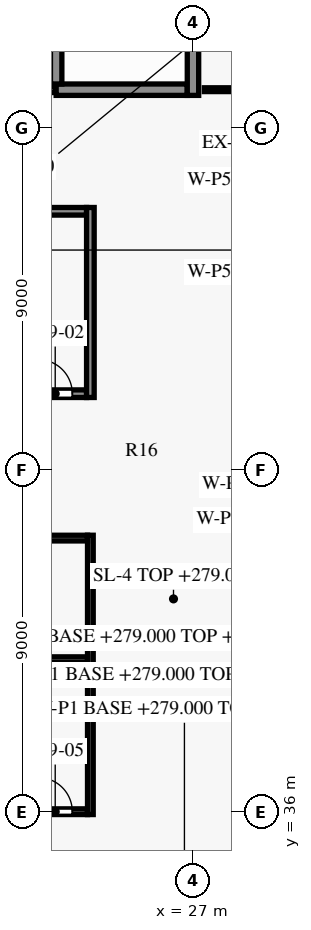
"""IFC4 building model, lengths in metres.
Left out: names, types, materials, properties, quantities, classifications, styles, units other than length and angle.
Written with IfcOpenShell. Run it as: python <this file> out.ifc"""

import sys

from ifc_helpers import new_model, si_unit, direction, frame, frame_2d, origin, place, context, subcontext, project, spatial, rectangle, extrude, element, fill, save


model = new_model("IFC4")
c1 = context("Model", 3, precision=1e-05, world=origin(), true_north=direction((0.0, 1.0)))
c2 = subcontext(c1, "Body", "Model", "MODEL_VIEW")
j1 = project(units=[si_unit("LENGTHUNIT", "METRE"), si_unit("PLANEANGLEUNIT", "RADIAN")], contexts=[c1])
p1 = place(None, origin())
s1 = spatial("IfcSite", under=j1, at=p1, CompositionType="ELEMENT")
p2 = place(p1, origin())
s2 = spatial("IfcBuilding", under=s1, at=p2, CompositionType="ELEMENT")
p3 = place(p2, frame((0.0, 0.0, 279.0)))
s3 = spatial("IfcBuildingStorey", under=s2, at=p3, CompositionType="ELEMENT", Elevation=279.0)
p4 = place(p3, frame((12.4, 36.0, 0.0), z_axis=(0.0, 0.0, 1.0), x_axis=(1.0, 0.0, 0.0)))
e1 = element("IfcWall", 1, at=p4, inside=s3, PredefinedType="SHEAR", context=c2, shape_type="SweptSolid", body=[
    extrude(rectangle(XDim=11.825, YDim=0.15, at=frame_2d((5.913, 0.0))), origin(), (0.0, 0.0, 1.0), 3.5),
])
p5 = place(p4, frame((1.525, 0.0, 0.0)))
e2 = element("IfcOpeningElement", 2, at=p5, cuts=e1, PredefinedType="OPENING", context=c2, shape_type="SweptSolid", body=[
    extrude(rectangle(XDim=0.95, YDim=2.1, at=frame_2d((0.475, 1.05))), frame((0.0, 0.085, 0.0), z_axis=(0.0, -1.0, 0.0), x_axis=(1.0, 0.0, 0.0)), (0.0, 0.0, 1.0), 0.17),
])
p6 = place(p4, frame((5.75, 0.0, 0.0)))
e3 = element("IfcOpeningElement", 3, at=p6, cuts=e1, PredefinedType="OPENING", context=c2, shape_type="SweptSolid", body=[
    extrude(rectangle(XDim=0.9, YDim=2.1, at=frame_2d((0.45, 1.05))), frame((0.0, 0.085, 0.0), z_axis=(0.0, -1.0, 0.0), x_axis=(1.0, 0.0, 0.0)), (0.0, 0.0, 1.0), 0.17),
])
p7 = place(p4, frame((10.525, 0.0, 0.0)))
e4 = element("IfcOpeningElement", 4, at=p7, cuts=e1, PredefinedType="OPENING", context=c2, shape_type="SweptSolid", body=[
    extrude(rectangle(XDim=0.9, YDim=2.1, at=frame_2d((0.45, 1.05))), frame((0.0, 0.085, 0.0), z_axis=(0.0, -1.0, 0.0), x_axis=(1.0, 0.0, 0.0)), (0.0, 0.0, 1.0), 0.17),
])
p8 = place(p3, frame((8.1, 40.0, 0.0), z_axis=(0.0, 0.0, 1.0), x_axis=(1.0, 0.0, 0.0)))
e5 = element("IfcWall", 5, at=p8, inside=s3, PredefinedType="SHEAR", context=c2, shape_type="SweptSolid", body=[
    extrude(rectangle(XDim=16.125, YDim=0.15, at=frame_2d((8.062, 0.0))), origin(), (0.0, 0.0, 1.0), 3.5),
])
p9 = place(p3, frame((8.1, 43.2, 0.0), z_axis=(0.0, 0.0, 1.0), x_axis=(1.0, 0.0, 0.0)))
e6 = element("IfcWall", 6, at=p9, inside=s3, PredefinedType="SHEAR", context=c2, shape_type="SweptSolid", body=[
    extrude(rectangle(XDim=16.125, YDim=0.15, at=frame_2d((8.062, 0.0))), origin(), (0.0, 0.0, 1.0), 3.5),
])
p10 = place(p9, frame((5.825, 0.0, 0.0)))
e7 = element("IfcOpeningElement", 7, at=p10, cuts=e6, PredefinedType="OPENING", context=c2, shape_type="SweptSolid", body=[
    extrude(rectangle(XDim=0.9, YDim=2.1, at=frame_2d((0.45, 1.05))), frame((0.0, 0.085, 0.0), z_axis=(0.0, -1.0, 0.0), x_axis=(1.0, 0.0, 0.0)), (0.0, 0.0, 1.0), 0.17),
])
p11 = place(p9, frame((13.075, 0.0, 0.0)))
e8 = element("IfcOpeningElement", 8, at=p11, cuts=e6, PredefinedType="OPENING", context=c2, shape_type="SweptSolid", body=[
    extrude(rectangle(XDim=0.9, YDim=2.1, at=frame_2d((0.45, 1.05))), frame((0.0, 0.085, 0.0), z_axis=(0.0, -1.0, 0.0), x_axis=(1.0, 0.0, 0.0)), (0.0, 0.0, 1.0), 0.17),
])
p12 = place(p3, frame((21.6, 47.0, 0.0), z_axis=(0.0, 0.0, 1.0), x_axis=(1.0, 0.0, 0.0)))
e9 = element("IfcWall", 9, at=p12, inside=s3, PredefinedType="SHEAR", context=c2, shape_type="SweptSolid", body=[
    extrude(rectangle(XDim=2.6, YDim=0.2, at=frame_2d((1.3, 0.0))), origin(), (0.0, 0.0, 1.0), 3.5),
])
p13 = place(p12, frame((1.325, 0.0, 0.0)))
e10 = element("IfcOpeningElement", 10, at=p13, cuts=e9, PredefinedType="OPENING", context=c2, shape_type="SweptSolid", body=[
    extrude(rectangle(XDim=0.9, YDim=2.1, at=frame_2d((0.45, 1.05))), frame((0.0, 0.11, 0.0), z_axis=(0.0, -1.0, 0.0), x_axis=(1.0, 0.0, 0.0)), (0.0, 0.0, 1.0), 0.22),
])
p14 = place(p3, frame((21.6, 51.8, 0.0), z_axis=(0.0, 0.0, 1.0), x_axis=(1.0, 0.0, 0.0)))
e11 = element("IfcWall", 11, at=p14, inside=s3, PredefinedType="SHEAR", context=c2, shape_type="SweptSolid", body=[
    extrude(rectangle(XDim=2.6, YDim=0.2, at=frame_2d((1.3, 0.0))), origin(), (0.0, 0.0, 1.0), 3.5),
])
p15 = place(p3, frame((13.5, 55.0, 0.0), z_axis=(0.0, 0.0, 1.0), x_axis=(1.0, 0.0, 0.0)))
e12 = element("IfcWall", 12, at=p15, inside=s3, PredefinedType="SHEAR", context=c2, shape_type="SweptSolid", body=[
    extrude(rectangle(XDim=9.9, YDim=0.15, at=frame_2d((4.95, 0.0))), origin(), (0.0, 0.0, 1.0), 3.5),
])
p16 = place(p15, frame((2.45, 0.0, 0.0)))
e13 = element("IfcOpeningElement", 13, at=p16, cuts=e12, PredefinedType="OPENING", context=c2, shape_type="SweptSolid", body=[
    extrude(rectangle(XDim=1.0, YDim=2.1, at=frame_2d((0.5, 1.05))), frame((0.0, 0.085, 0.0), z_axis=(0.0, -1.0, 0.0), x_axis=(1.0, 0.0, 0.0)), (0.0, 0.0, 1.0), 0.17),
])
p17 = place(p15, frame((7.4, 0.0, 0.0)))
e14 = element("IfcOpeningElement", 14, at=p17, cuts=e12, PredefinedType="OPENING", context=c2, shape_type="SweptSolid", body=[
    extrude(rectangle(XDim=1.0, YDim=2.1, at=frame_2d((0.5, 1.05))), frame((0.0, 0.085, 0.0), z_axis=(0.0, -1.0, 0.0), x_axis=(1.0, 0.0, 0.0)), (0.0, 0.0, 1.0), 0.17),
])
p18 = place(p3, frame((23.4, 55.0, 0.0), z_axis=(0.0, 0.0, 1.0), x_axis=(1.0, 0.0, 0.0)))
e15 = element("IfcWall", 15, at=p18, inside=s3, PredefinedType="SHEAR", context=c2, shape_type="SweptSolid", body=[
    extrude(rectangle(XDim=3.45, YDim=0.3, at=frame_2d((1.725, 0.0))), origin(), (0.0, 0.0, 1.0), 3.5),
])
p19 = place(p3, frame((23.4, 55.15, 0.0), z_axis=(0.0, 0.0, 1.0), x_axis=(0.0, 1.0, 0.0)))
e16 = element("IfcWall", 16, at=p19, inside=s3, PredefinedType="SHEAR", context=c2, shape_type="SweptSolid", body=[
    extrude(rectangle(XDim=8.0, YDim=0.3, at=frame_2d((4.0, 0.0))), origin(), (0.0, 0.0, 1.0), 3.5),
])
p20 = place(p3, frame((24.3, 35.925, 0.0), z_axis=(0.0, 0.0, 1.0), x_axis=(0.0, 1.0, 0.0)))
e17 = element("IfcWall", 17, at=p20, inside=s3, PredefinedType="SHEAR", context=c2, shape_type="SweptSolid", body=[
    extrude(rectangle(XDim=7.35, YDim=0.15, at=frame_2d((3.675, 0.0))), origin(), (0.0, 0.0, 1.0), 3.5),
])
p21 = place(p3, frame((24.3, 46.9, 0.0), z_axis=(0.0, 0.0, 1.0), x_axis=(0.0, 1.0, 0.0)))
e18 = element("IfcWall", 18, at=p21, inside=s3, PredefinedType="SHEAR", context=c2, shape_type="SweptSolid", body=[
    extrude(rectangle(XDim=5.0, YDim=0.2, at=frame_2d((2.5, 0.0))), origin(), (0.0, 0.0, 1.0), 3.5),
])
p22 = place(p3, frame((27.0, 54.85, 0.0), z_axis=(0.0, 0.0, 1.0), x_axis=(0.0, 1.0, 0.0)))
e19 = element("IfcWall", 19, at=p22, inside=s3, PredefinedType="SHEAR", context=c2, shape_type="SweptSolid", body=[
    extrude(rectangle(XDim=8.6, YDim=0.3, at=frame_2d((4.3, 0.0))), origin(), (0.0, 0.0, 1.0), 3.5),
])
p23 = place(p22, frame((6.55, 0.0, 0.0)))
e20 = element("IfcOpeningElement", 20, at=p23, cuts=e19, PredefinedType="OPENING", context=c2, shape_type="SweptSolid", body=[
    extrude(rectangle(XDim=1.2, YDim=2.2, at=frame_2d((0.6, 1.1))), frame((0.0, 0.16, 0.0), z_axis=(0.0, -1.0, 0.0), x_axis=(1.0, 0.0, 0.0)), (0.0, 0.0, 1.0), 0.32),
])
p24 = place(p3, frame((27.3, 55.0, 0.0), z_axis=(0.0, 0.0, 1.0), x_axis=(1.0, 0.0, 0.0)))
e21 = element("IfcWall", 21, at=p24, inside=s3, PredefinedType="PARTITIONING", context=c2, shape_type="SweptSolid", body=[
    extrude(rectangle(XDim=3.7, YDim=0.1, at=frame_2d((1.85, 0.0))), origin(), (0.0, 0.0, 1.0), 3.33),
])
p25 = place(p24, frame((1.425, 0.0, 0.0)))
e22 = element("IfcOpeningElement", 22, at=p25, cuts=e21, PredefinedType="OPENING", context=c2, shape_type="SweptSolid", body=[
    extrude(rectangle(XDim=0.9, YDim=2.1, at=frame_2d((0.45, 1.05))), frame((0.0, 0.06, 0.0), z_axis=(0.0, -1.0, 0.0), x_axis=(1.0, 0.0, 0.0)), (0.0, 0.0, 1.0), 0.12),
])
p26 = place(p13, origin())
e23 = element("IfcDoor", 23, at=p26, inside=s3, OperationType="SINGLE_SWING_LEFT", PredefinedType="DOOR", context=c2, shape_type="SweptSolid", body=[
    extrude(rectangle(XDim=0.9, YDim=2.1, at=frame_2d((0.45, 1.05))), frame((0.0, 0.025, 0.0), z_axis=(0.0, -1.0, 0.0), x_axis=(1.0, 0.0, 0.0)), (0.0, 0.0, 1.0), 0.05),
])
fill(e10, e23)
p27 = place(p7, origin())
e24 = element("IfcDoor", 24, at=p27, inside=s3, OperationType="SINGLE_SWING_RIGHT", PredefinedType="DOOR", context=c2, shape_type="SweptSolid", body=[
    extrude(rectangle(XDim=0.9, YDim=2.1, at=frame_2d((0.45, 1.05))), frame((0.0, 0.025, 0.0), z_axis=(0.0, -1.0, 0.0), x_axis=(1.0, 0.0, 0.0)), (0.0, 0.0, 1.0), 0.05),
])
fill(e4, e24)
save(model, sys.argv[1])
